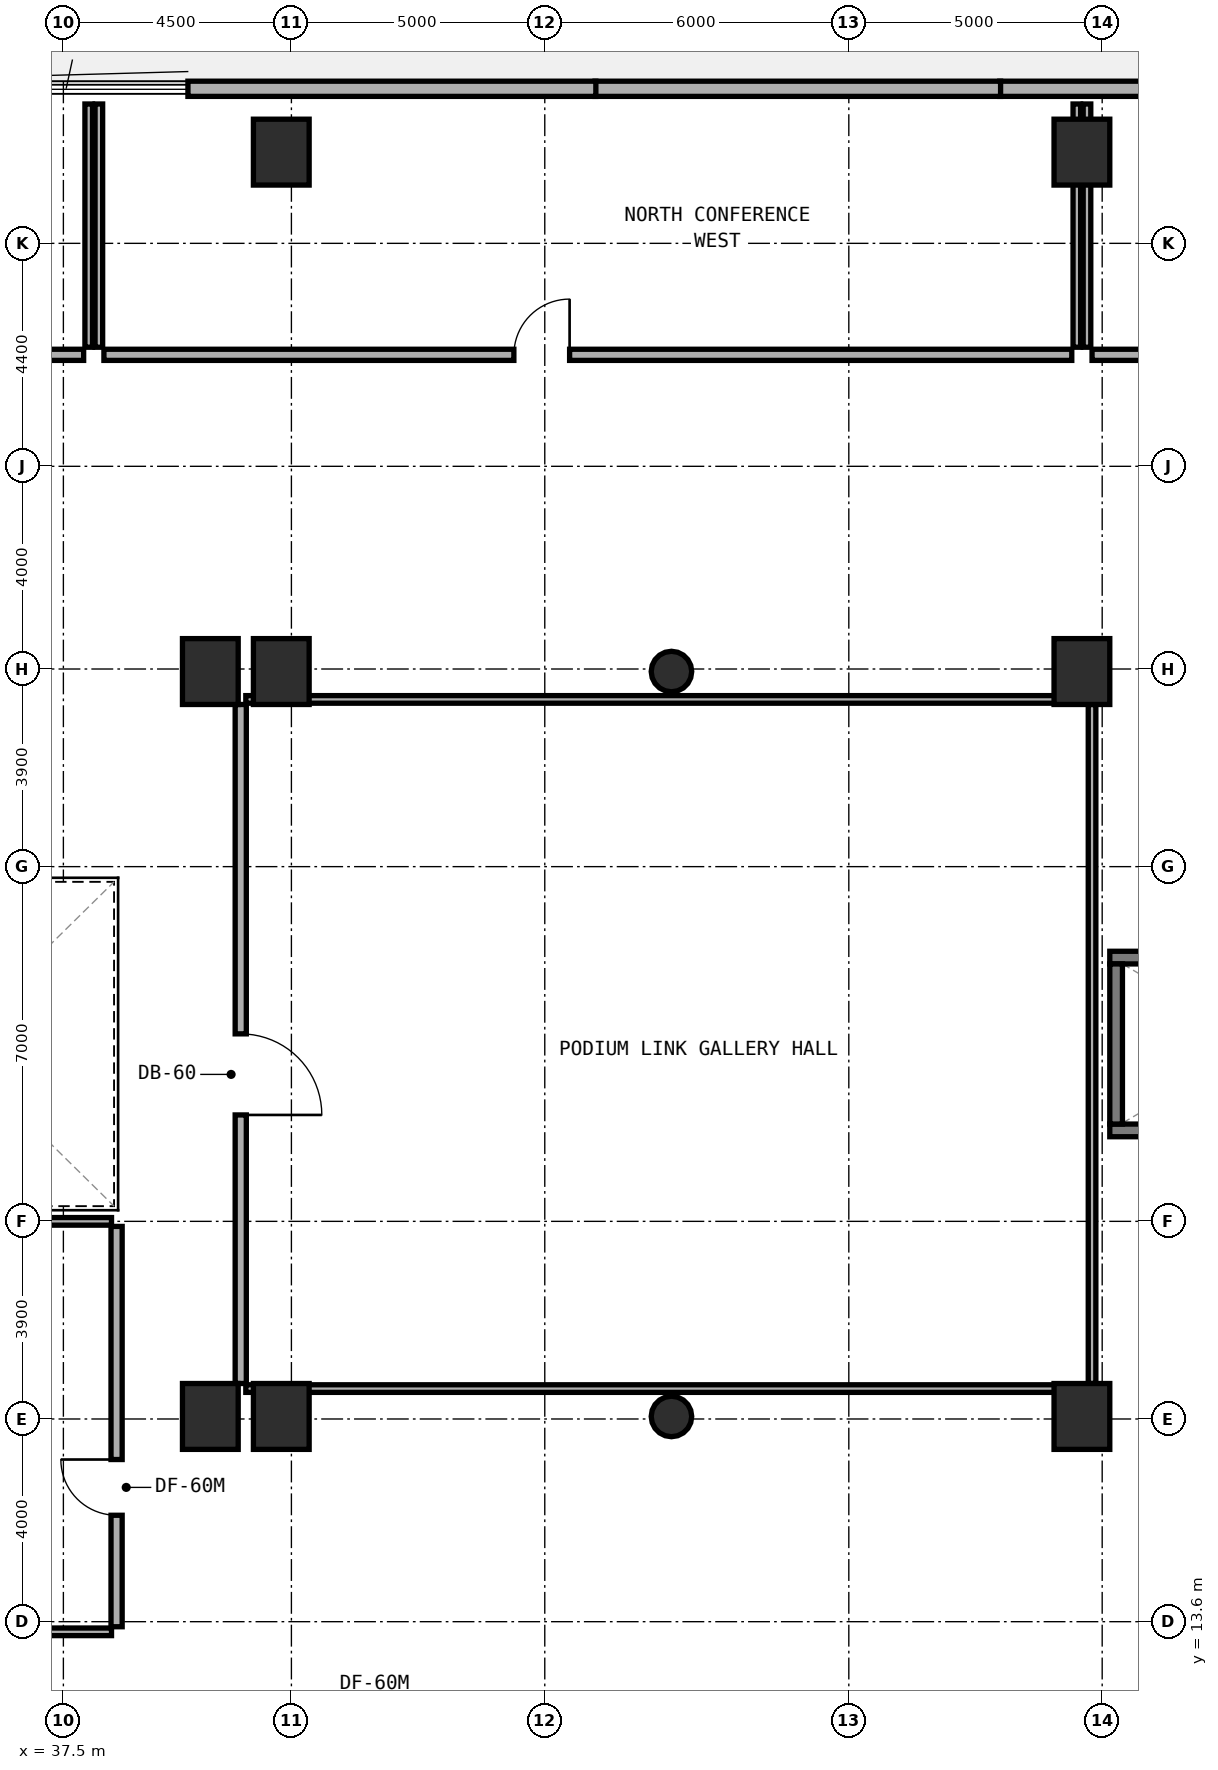
"""IFC4 building model, lengths in metres.
Left out: names, types, materials, properties, quantities, classifications, styles, units other than length and angle.
Written with IfcOpenShell. Run it as: python <this file> out.ifc"""

import sys

from ifc_helpers import new_model, si_unit, direction, frame, frame_2d, origin, origin_2d, place, context, subcontext, project, spatial, rectangle, circle, extrude, element, fill, save


model = new_model("IFC4")
c1 = context("Model", 3, precision=1e-05, world=origin(), true_north=direction((0.0, 1.0)))
c2 = subcontext(c1, "Body", "Model", "MODEL_VIEW")
j1 = project(units=[si_unit("LENGTHUNIT", "METRE"), si_unit("PLANEANGLEUNIT", "RADIAN")], contexts=[c1])
p1 = place(None, origin())
s1 = spatial("IfcSite", under=j1, at=p1, CompositionType="ELEMENT")
p2 = place(p1, origin())
s2 = spatial("IfcBuilding", under=s1, at=p2, CompositionType="ELEMENT")
p3 = place(p2, frame((0.0, 0.0, 15.0)))
s3 = spatial("IfcBuildingStorey", under=s2, at=p3, CompositionType="ELEMENT", Elevation=15.0)
for number, where, z_axis, x_axis in (
    (1, (58.15, 23.295, 0.0), (0.0, 0.0, 1.0), (1.0, 0.0, 0.0)),
    (2, (58.15, 26.705, 0.0), (0.0, 0.0, 1.0), (1.0, 0.0, 0.0)),
):
    element("IfcWall", number, at=place(p3, frame(where, z_axis=z_axis, x_axis=x_axis)), inside=s3, PredefinedType="STANDARD", context=c2, shape_type="SweptSolid", body=[
        extrude(rectangle(XDim=7.5, YDim=0.25, at=frame_2d((3.75, 0.0))), origin(), (0.0, 0.0, 1.0), 4.5),
    ])
p4 = place(p3, frame((58.275, 23.42, 0.0), z_axis=(0.0, 0.0, 1.0), x_axis=(0.0, 1.0, 0.0)))
e3 = element("IfcWall", 3, at=p4, inside=s3, PredefinedType="STANDARD", context=c2, shape_type="SweptSolid", body=[
    extrude(rectangle(XDim=3.16, YDim=0.25, at=frame_2d((1.58, 0.0))), origin(), (0.0, 0.0, 1.0), 4.5),
])
for number, where, z_axis, x_axis in (
    (4, (40.4, 17.65, 0.0), (0.0, 0.0, 1.0), (1.0, 0.0, 0.0)),
    (5, (40.4, 32.35, 0.0), (0.0, 0.0, 1.0), (1.0, 0.0, 0.0)),
    (6, (41.8, 17.65, 0.0), (0.0, 0.0, 1.0), (1.0, 0.0, 0.0)),
    (7, (41.8, 32.35, 0.0), (0.0, 0.0, 1.0), (1.0, 0.0, 0.0)),
):
    element("IfcColumn", number, at=place(p3, frame(where, z_axis=z_axis, x_axis=x_axis)), inside=s3, PredefinedType="COLUMN", context=c2, shape_type="SweptSolid", body=[
        extrude(rectangle(XDim=1.1, YDim=1.3, at=origin_2d()), origin(), (0.0, 0.0, 1.0), 4.5),
    ])
for number, where, z_axis, x_axis in (
    (8, (49.5, 17.65, 0.0), (0.0, 0.0, 1.0), (1.0, 0.0, 0.0)),
    (9, (49.5, 32.35, 0.0), (0.0, 0.0, 1.0), (1.0, 0.0, 0.0)),
):
    element("IfcColumn", number, at=place(p3, frame(where, z_axis=z_axis, x_axis=x_axis)), inside=s3, PredefinedType="COLUMN", context=c2, shape_type="SweptSolid", body=[
        extrude(circle(Radius=0.4, at=origin_2d()), origin(), (0.0, 0.0, 1.0), 4.5),
    ])
for number, where, z_axis, x_axis in (
    (10, (57.6, 17.65, 0.0), (0.0, 0.0, 1.0), (1.0, 0.0, 0.0)),
    (11, (57.6, 32.35, 0.0), (0.0, 0.0, 1.0), (1.0, 0.0, 0.0)),
    (12, (41.8, 42.6, 0.0), (0.0, 0.0, 1.0), (1.0, 0.0, 0.0)),
    (13, (57.6, 42.6, 0.0), (0.0, 0.0, 1.0), (1.0, 0.0, 0.0)),
):
    element("IfcColumn", number, at=place(p3, frame(where, z_axis=z_axis, x_axis=x_axis)), inside=s3, PredefinedType="COLUMN", context=c2, shape_type="SweptSolid", body=[
        extrude(rectangle(XDim=1.1, YDim=1.3, at=origin_2d()), origin(), (0.0, 0.0, 1.0), 4.5),
    ])
p5 = place(p3, frame((64.028, 43.85, 0.0), z_axis=(0.0, 0.0, 1.0), x_axis=(-1.0, 0.0, 0.0)))
e14 = element("IfcWall", 14, at=p5, inside=s3, PredefinedType="STANDARD", context=c2, shape_type="SweptSolid", body=[
    extrude(rectangle(XDim=8.049, YDim=0.3, at=frame_2d((4.024, 0.0))), origin(), (0.0, 0.0, 1.0), 4.1),
])
p6 = place(p5, frame((3.228, 0.0, 0.0)))
e15 = element("IfcOpeningElement", 15, at=p6, cuts=e14, PredefinedType="OPENING", context=c2, shape_type="SweptSolid", body=[
    extrude(rectangle(XDim=1.6, YDim=2.2, at=frame_2d((0.8, 1.1))), frame((0.0, 0.16, 0.0), z_axis=(0.0, -1.0, 0.0), x_axis=(1.0, 0.0, 0.0)), (0.0, 0.0, 1.0), 0.32),
])
p7 = place(p3, frame((55.995, 43.85, 0.0), z_axis=(0.0, 0.0, 1.0), x_axis=(-1.0, 0.0, 0.0)))
e16 = element("IfcWall", 16, at=p7, inside=s3, PredefinedType="STANDARD", context=c2, shape_type="SweptSolid", body=[
    extrude(rectangle(XDim=8.003, YDim=0.3, at=frame_2d((4.001, 0.0))), origin(), (0.0, 0.0, 1.0), 4.1),
])
p8 = place(p3, frame((48.008, 43.85, 0.0), z_axis=(0.0, 0.0, 1.0), x_axis=(-1.0, 0.0, 0.0)))
e17 = element("IfcWall", 17, at=p8, inside=s3, PredefinedType="STANDARD", context=c2, shape_type="SweptSolid", body=[
    extrude(rectangle(XDim=8.05, YDim=0.3, at=frame_2d((4.025, 0.0))), origin(), (0.0, 0.0, 1.0), 4.1),
])
p9 = place(p3, frame((31.3, 13.4, 0.0), z_axis=(0.0, 0.0, 1.0), x_axis=(1.0, 0.0, 0.0)))
e18 = element("IfcWall", 18, at=p9, inside=s3, PredefinedType="PARTITIONING", context=c2, shape_type="SweptSolid", body=[
    extrude(rectangle(XDim=7.15, YDim=0.15, at=frame_2d((3.575, 0.0))), origin(), (0.0, 0.0, 1.0), 3.625),
])
p10 = place(p3, frame((31.3, 21.5, 0.0), z_axis=(0.0, 0.0, 1.0), x_axis=(1.0, 0.0, 0.0)))
e19 = element("IfcWall", 19, at=p10, inside=s3, PredefinedType="PARTITIONING", context=c2, shape_type="SweptSolid", body=[
    extrude(rectangle(XDim=7.15, YDim=0.15, at=frame_2d((3.575, 0.0))), origin(), (0.0, 0.0, 1.0), 3.175),
])
p11 = place(p3, frame((38.55, 13.5, 0.0), z_axis=(0.0, 0.0, 1.0), x_axis=(0.0, 1.0, 0.0)))
e20 = element("IfcWall", 20, at=p11, inside=s3, PredefinedType="SOLIDWALL", context=c2, shape_type="SweptSolid", body=[
    extrude(rectangle(XDim=7.9, YDim=0.22, at=frame_2d((3.95, 0.0))), origin(), (0.0, 0.0, 1.0), 3.175),
])
p12 = place(p11, frame((2.2, 0.0, 0.0)))
e21 = element("IfcOpeningElement", 21, at=p12, cuts=e20, PredefinedType="OPENING", context=c2, shape_type="SweptSolid", body=[
    extrude(rectangle(XDim=1.1, YDim=2.1, at=frame_2d((0.55, 1.05))), frame((0.0, 0.12, 0.0), z_axis=(0.0, -1.0, 0.0), x_axis=(1.0, 0.0, 0.0)), (0.0, 0.0, 1.0), 0.24),
])
p13 = place(p3, frame((57.8, 18.3, 0.0), z_axis=(0.0, 0.0, 1.0), x_axis=(0.0, 1.0, 0.0)))
e22 = element("IfcWall", 22, at=p13, inside=s3, PredefinedType="PARTITIONING", context=c2, shape_type="SweptSolid", body=[
    extrude(rectangle(XDim=13.4, YDim=0.15, at=frame_2d((6.7, 0.0))), origin(), (0.0, 0.0, 1.0), 3.375),
])
for number, where, z_axis, x_axis in (
    (23, (41.1, 18.2, 0.0), (0.0, 0.0, 1.0), (1.0, 0.0, 0.0)),
    (24, (41.1, 31.8, 0.0), (0.0, 0.0, 1.0), (1.0, 0.0, 0.0)),
):
    element("IfcWall", number, at=place(p3, frame(where, z_axis=z_axis, x_axis=x_axis)), inside=s3, PredefinedType="PARTITIONING", context=c2, shape_type="SweptSolid", body=[
        extrude(rectangle(XDim=16.6, YDim=0.15, at=frame_2d((8.3, 0.0))), origin(), (0.0, 0.0, 1.0), 3.375),
    ])
p14 = place(p3, frame((41.0, 18.3, 0.0), z_axis=(0.0, 0.0, 1.0), x_axis=(0.0, 1.0, 0.0)))
e25 = element("IfcWall", 25, at=p14, inside=s3, PredefinedType="SOLIDWALL", context=c2, shape_type="SweptSolid", body=[
    extrude(rectangle(XDim=13.4, YDim=0.22, at=frame_2d((6.7, 0.0))), origin(), (0.0, 0.0, 1.0), 4.1),
])
p15 = place(p14, frame((5.3, 0.0, 0.0)))
e26 = element("IfcOpeningElement", 26, at=p15, cuts=e25, PredefinedType="OPENING", context=c2, shape_type="SweptSolid", body=[
    extrude(rectangle(XDim=1.6, YDim=2.15, at=frame_2d((0.8, 1.075))), frame((0.0, 0.12, 0.0), z_axis=(0.0, -1.0, 0.0), x_axis=(1.0, 0.0, 0.0)), (0.0, 0.0, 1.0), 0.24),
])
p16 = place(p3, frame((38.0, 38.75, 0.0), z_axis=(0.0, 0.0, 1.0), x_axis=(0.0, 1.0, 0.0)))
e27 = element("IfcWall", 27, at=p16, inside=s3, PredefinedType="PARTITIONING", context=c2, shape_type="SweptSolid", body=[
    extrude(rectangle(XDim=4.8, YDim=0.15, at=frame_2d((2.4, 0.0))), origin(), (0.0, 0.0, 1.0), 4.1),
])
p17 = place(p3, frame((33.3, 38.6, 0.0), z_axis=(0.0, 0.0, 1.0), x_axis=(1.0, 0.0, 0.0)))
e28 = element("IfcWall", 28, at=p17, inside=s3, PredefinedType="SOLIDWALL", context=c2, shape_type="SweptSolid", body=[
    extrude(rectangle(XDim=4.6, YDim=0.22, at=frame_2d((2.3, 0.0))), origin(), (0.0, 0.0, 1.0), 3.625),
])
p18 = place(p17, frame((1.845, 0.0, 0.0)))
e29 = element("IfcOpeningElement", 29, at=p18, cuts=e28, PredefinedType="OPENING", context=c2, shape_type="SweptSolid", body=[
    extrude(rectangle(XDim=1.1, YDim=2.1, at=frame_2d((0.55, 1.05))), frame((0.0, 0.12, 0.0), z_axis=(0.0, -1.0, 0.0), x_axis=(1.0, 0.0, 0.0)), (0.0, 0.0, 1.0), 0.24),
])
p19 = place(p3, frame((38.2, 38.75, 0.0), z_axis=(0.0, 0.0, 1.0), x_axis=(0.0, 1.0, 0.0)))
e30 = element("IfcWall", 30, at=p19, inside=s3, PredefinedType="PARTITIONING", context=c2, shape_type="SweptSolid", body=[
    extrude(rectangle(XDim=4.8, YDim=0.15, at=frame_2d((2.4, 0.0))), origin(), (0.0, 0.0, 1.0), 4.1),
])
p20 = place(p3, frame((57.5, 38.75, 0.0), z_axis=(0.0, 0.0, 1.0), x_axis=(0.0, 1.0, 0.0)))
e31 = element("IfcWall", 31, at=p20, inside=s3, PredefinedType="PARTITIONING", context=c2, shape_type="SweptSolid", body=[
    extrude(rectangle(XDim=4.8, YDim=0.15, at=frame_2d((2.4, 0.0))), origin(), (0.0, 0.0, 1.0), 3.275),
])
p21 = place(p3, frame((38.3, 38.6, 0.0), z_axis=(0.0, 0.0, 1.0), x_axis=(1.0, 0.0, 0.0)))
e32 = element("IfcWall", 32, at=p21, inside=s3, PredefinedType="SOLIDWALL", context=c2, shape_type="SweptSolid", body=[
    extrude(rectangle(XDim=19.1, YDim=0.22, at=frame_2d((9.55, 0.0))), origin(), (0.0, 0.0, 1.0), 3.375),
])
p22 = place(p21, frame((8.09, 0.0, 0.0)))
e33 = element("IfcOpeningElement", 33, at=p22, cuts=e32, PredefinedType="OPENING", context=c2, shape_type="SweptSolid", body=[
    extrude(rectangle(XDim=1.1, YDim=2.1, at=frame_2d((0.55, 1.05))), frame((0.0, 0.12, 0.0), z_axis=(0.0, -1.0, 0.0), x_axis=(1.0, 0.0, 0.0)), (0.0, 0.0, 1.0), 0.24),
])
p23 = place(p3, frame((57.7, 38.75, 0.0), z_axis=(0.0, 0.0, 1.0), x_axis=(0.0, 1.0, 0.0)))
e34 = element("IfcWall", 34, at=p23, inside=s3, PredefinedType="PARTITIONING", context=c2, shape_type="SweptSolid", body=[
    extrude(rectangle(XDim=4.8, YDim=0.15, at=frame_2d((2.4, 0.0))), origin(), (0.0, 0.0, 1.0), 3.375),
])
p24 = place(p3, frame((57.8, 38.6, 0.0), z_axis=(0.0, 0.0, 1.0), x_axis=(1.0, 0.0, 0.0)))
e35 = element("IfcWall", 35, at=p24, inside=s3, PredefinedType="SOLIDWALL", context=c2, shape_type="SweptSolid", body=[
    extrude(rectangle(XDim=27.5, YDim=0.22, at=frame_2d((13.75, 0.0))), origin(), (0.0, 0.0, 1.0), 3.575),
])
p25 = place(p24, frame((11.87, 0.0, 0.0)))
e36 = element("IfcOpeningElement", 36, at=p25, cuts=e35, PredefinedType="OPENING", context=c2, shape_type="SweptSolid", body=[
    extrude(rectangle(XDim=1.1, YDim=2.1, at=frame_2d((0.55, 1.05))), frame((0.0, 0.12, 0.0), z_axis=(0.0, -1.0, 0.0), x_axis=(1.0, 0.0, 0.0)), (0.0, 0.0, 1.0), 0.24),
])
p26 = place(p12, origin())
e37 = element("IfcDoor", 37, at=p26, inside=s3, OperationType="SINGLE_SWING_RIGHT", PredefinedType="DOOR", context=c2, shape_type="SweptSolid", body=[
    extrude(rectangle(XDim=1.1, YDim=2.1, at=frame_2d((0.55, 1.05))), frame((0.0, 0.025, 0.0), z_axis=(0.0, -1.0, 0.0), x_axis=(1.0, 0.0, 0.0)), (0.0, 0.0, 1.0), 0.05),
])
fill(e21, e37)
p27 = place(p15, frame((1.6, 0.0, 0.0), z_axis=(0.0, 0.0, 1.0), x_axis=(-1.0, 0.0, 0.0)))
e38 = element("IfcDoor", 38, at=p27, inside=s3, OperationType="SINGLE_SWING_RIGHT", PredefinedType="DOOR", context=c2, shape_type="SweptSolid", body=[
    extrude(rectangle(XDim=1.6, YDim=2.15, at=frame_2d((0.8, 1.075))), frame((0.0, 0.025, 0.0), z_axis=(0.0, -1.0, 0.0), x_axis=(1.0, 0.0, 0.0)), (0.0, 0.0, 1.0), 0.05),
])
fill(e26, e38)
p28 = place(p22, origin())
e39 = element("IfcDoor", 39, at=p28, inside=s3, OperationType="SINGLE_SWING_RIGHT", PredefinedType="DOOR", context=c2, shape_type="SweptSolid", body=[
    extrude(rectangle(XDim=1.1, YDim=2.1, at=frame_2d((0.55, 1.05))), frame((0.0, 0.025, 0.0), z_axis=(0.0, -1.0, 0.0), x_axis=(1.0, 0.0, 0.0)), (0.0, 0.0, 1.0), 0.05),
])
fill(e33, e39)
save(model, sys.argv[1])
